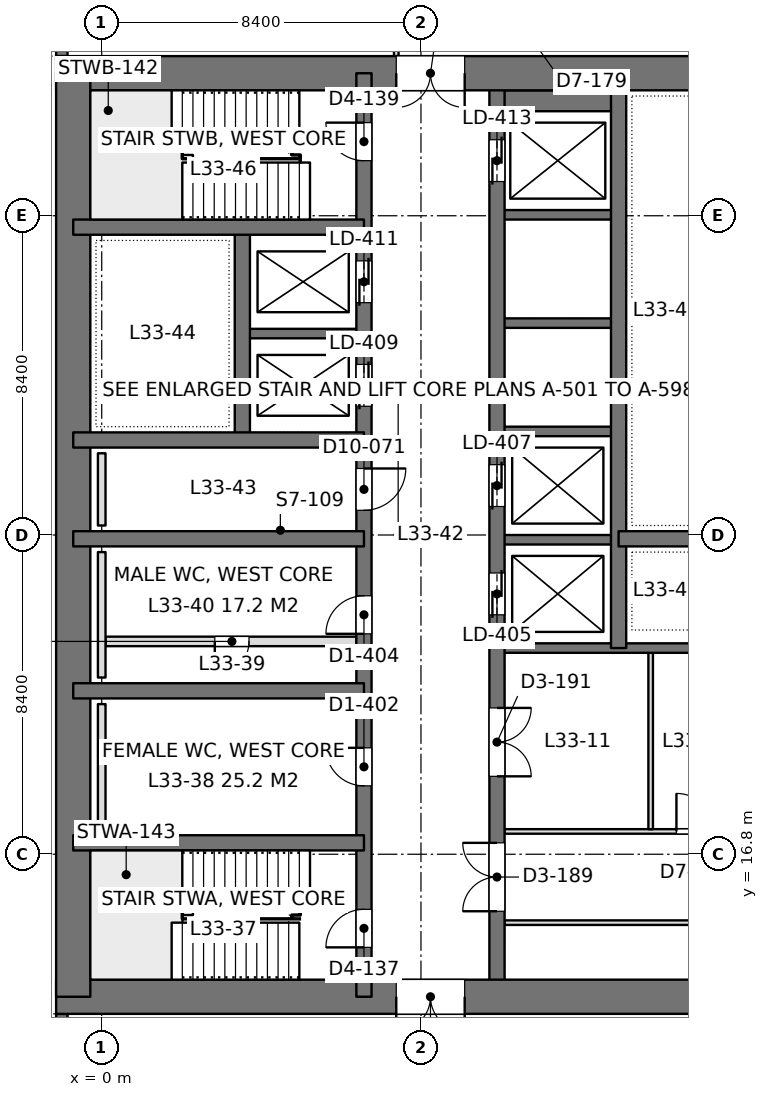
"""IFC4 building model, lengths in metres.
Left out: names, types, materials, properties, quantities, classifications, styles, units other than length and angle.
Written with IfcOpenShell. Run it as: python <this file> out.ifc"""

import sys

from ifc_helpers import new_model, si_unit, direction, frame, frame_2d, origin, place, context, subcontext, project, spatial, rectangle, extrude, element, fill, save


model = new_model("IFC4")
c1 = context("Model", 3, precision=1e-05, world=origin(), true_north=direction((0.0, 1.0)))
c2 = subcontext(c1, "Body", "Model", "MODEL_VIEW")
j1 = project(units=[si_unit("LENGTHUNIT", "METRE"), si_unit("PLANEANGLEUNIT", "RADIAN")], contexts=[c1])
p1 = place(None, origin())
s1 = spatial("IfcSite", under=j1, at=p1, CompositionType="ELEMENT")
p2 = place(p1, origin())
s2 = spatial("IfcBuilding", under=s1, at=p2, CompositionType="ELEMENT")
p3 = place(p2, frame((0.0, 0.0, 147.0)))
s3 = spatial("IfcBuildingStorey", under=s2, at=p3, CompositionType="ELEMENT", Elevation=147.0)
p4 = place(p3, frame((-1.2, 13.05, 0.0), z_axis=(0.0, 0.0, 1.0), x_axis=(1.0, 0.0, 0.0)))
e1 = element("IfcWall", 1, at=p4, inside=s3, PredefinedType="SHEAR", context=c2, shape_type="SweptSolid", body=[
    extrude(rectangle(XDim=18.0, YDim=0.9, at=frame_2d((9.0, 0.0))), origin(), (0.0, 0.0, 1.0), 4.2),
])
p5 = place(p4, frame((8.95, 0.0, 0.0)))
e2 = element("IfcOpeningElement", 2, at=p5, cuts=e1, PredefinedType="OPENING", context=c2, shape_type="SweptSolid", body=[
    extrude(rectangle(XDim=1.8, YDim=2.4, at=frame_2d((0.9, 1.2))), frame((0.0, 0.46, 0.0), z_axis=(0.0, -1.0, 0.0), x_axis=(1.0, 0.0, 0.0)), (0.0, 0.0, 1.0), 0.92),
])
p6 = place(p3, frame((-1.2, 37.35, 0.0), z_axis=(0.0, 0.0, 1.0), x_axis=(1.0, 0.0, 0.0)))
e3 = element("IfcWall", 3, at=p6, inside=s3, PredefinedType="SHEAR", context=c2, shape_type="SweptSolid", body=[
    extrude(rectangle(XDim=18.0, YDim=0.9, at=frame_2d((9.0, 0.0))), origin(), (0.0, 0.0, 1.0), 4.2),
])
p7 = place(p6, frame((8.95, 0.0, 0.0)))
e4 = element("IfcOpeningElement", 4, at=p7, cuts=e3, PredefinedType="OPENING", context=c2, shape_type="SweptSolid", body=[
    extrude(rectangle(XDim=1.8, YDim=2.4, at=frame_2d((0.9, 1.2))), frame((0.0, 0.46, 0.0), z_axis=(0.0, -1.0, 0.0), x_axis=(1.0, 0.0, 0.0)), (0.0, 0.0, 1.0), 0.92),
])
p8 = place(p3, frame((-0.75, 13.05, 0.0), z_axis=(0.0, 0.0, 1.0), x_axis=(0.0, 1.0, 0.0)))
e5 = element("IfcWall", 5, at=p8, inside=s3, PredefinedType="SHEAR", context=c2, shape_type="SweptSolid", body=[
    extrude(rectangle(XDim=24.3, YDim=0.9, at=frame_2d((12.15, 0.0))), origin(), (0.0, 0.0, 1.0), 4.2),
])
p9 = place(p3, frame((6.9, 13.05, 0.0), z_axis=(0.0, 0.0, 1.0), x_axis=(0.0, 1.0, 0.0)))
e6 = element("IfcWall", 6, at=p9, inside=s3, PredefinedType="SHEAR", context=c2, shape_type="SweptSolid", body=[
    extrude(rectangle(XDim=24.3, YDim=0.4, at=frame_2d((12.15, 0.0))), origin(), (0.0, 0.0, 1.0), 4.2),
])
p10 = place(p9, frame((1.3, 0.0, 0.0)))
e7 = element("IfcOpeningElement", 7, at=p10, cuts=e6, PredefinedType="OPENING", context=c2, shape_type="SweptSolid", body=[
    extrude(rectangle(XDim=1.0, YDim=2.2, at=frame_2d((0.5, 1.1))), frame((0.0, 0.21, 0.0), z_axis=(0.0, -1.0, 0.0), x_axis=(1.0, 0.0, 0.0)), (0.0, 0.0, 1.0), 0.42),
])
p11 = place(p9, frame((22.0, 0.0, 0.0)))
e8 = element("IfcOpeningElement", 8, at=p11, cuts=e6, PredefinedType="OPENING", context=c2, shape_type="SweptSolid", body=[
    extrude(rectangle(XDim=1.0, YDim=2.2, at=frame_2d((0.5, 1.1))), frame((0.0, 0.21, 0.0), z_axis=(0.0, -1.0, 0.0), x_axis=(1.0, 0.0, 0.0)), (0.0, 0.0, 1.0), 0.42),
])
p12 = place(p9, frame((5.55, 0.0, 0.0)))
e9 = element("IfcOpeningElement", 9, at=p12, cuts=e6, PredefinedType="OPENING", context=c2, shape_type="SweptSolid", body=[
    extrude(rectangle(XDim=1.0, YDim=2.2, at=frame_2d((0.5, 1.1))), frame((0.0, 0.21, 0.0), z_axis=(0.0, -1.0, 0.0), x_axis=(1.0, 0.0, 0.0)), (0.0, 0.0, 1.0), 0.42),
])
p13 = place(p9, frame((9.55, 0.0, 0.0)))
e10 = element("IfcOpeningElement", 10, at=p13, cuts=e6, PredefinedType="OPENING", context=c2, shape_type="SweptSolid", body=[
    extrude(rectangle(XDim=1.0, YDim=2.2, at=frame_2d((0.5, 1.1))), frame((0.0, 0.21, 0.0), z_axis=(0.0, -1.0, 0.0), x_axis=(1.0, 0.0, 0.0)), (0.0, 0.0, 1.0), 0.42),
])
p14 = place(p9, frame((12.8, 0.0, 0.0)))
e11 = element("IfcOpeningElement", 11, at=p14, cuts=e6, PredefinedType="OPENING", context=c2, shape_type="SweptSolid", body=[
    extrude(rectangle(XDim=1.1, YDim=2.2, at=frame_2d((0.55, 1.1))), frame((0.0, 0.21, 0.0), z_axis=(0.0, -1.0, 0.0), x_axis=(1.0, 0.0, 0.0)), (0.0, 0.0, 1.0), 0.42),
])
p15 = place(p9, frame((15.538, 0.0, 0.0)))
e12 = element("IfcOpeningElement", 12, at=p15, cuts=e6, PredefinedType="OPENING", context=c2, shape_type="SweptSolid", body=[
    extrude(rectangle(XDim=1.1, YDim=2.2, at=frame_2d((0.55, 1.1))), frame((0.0, 0.21, 0.0), z_axis=(0.0, -1.0, 0.0), x_axis=(1.0, 0.0, 0.0)), (0.0, 0.0, 1.0), 0.42),
])
p16 = place(p9, frame((18.262, 0.0, 0.0)))
e13 = element("IfcOpeningElement", 13, at=p16, cuts=e6, PredefinedType="OPENING", context=c2, shape_type="SweptSolid", body=[
    extrude(rectangle(XDim=1.1, YDim=2.2, at=frame_2d((0.55, 1.1))), frame((0.0, 0.21, 0.0), z_axis=(0.0, -1.0, 0.0), x_axis=(1.0, 0.0, 0.0)), (0.0, 0.0, 1.0), 0.42),
])
p17 = place(p3, frame((10.4, 13.05, 0.0), z_axis=(0.0, 0.0, 1.0), x_axis=(0.0, 1.0, 0.0)))
e14 = element("IfcWall", 14, at=p17, inside=s3, PredefinedType="SHEAR", context=c2, shape_type="SweptSolid", body=[
    extrude(rectangle(XDim=24.3, YDim=0.4, at=frame_2d((12.15, 0.0))), origin(), (0.0, 0.0, 1.0), 4.2),
])
p18 = place(p17, frame((10.05, 0.0, 0.0)))
e15 = element("IfcOpeningElement", 15, at=p18, cuts=e14, PredefinedType="OPENING", context=c2, shape_type="SweptSolid", body=[
    extrude(rectangle(XDim=1.1, YDim=2.2, at=frame_2d((0.55, 1.1))), frame((0.0, 0.21, 0.0), z_axis=(0.0, -1.0, 0.0), x_axis=(1.0, 0.0, 0.0)), (0.0, 0.0, 1.0), 0.42),
])
p19 = place(p17, frame((12.9, 0.0, 0.0)))
e16 = element("IfcOpeningElement", 16, at=p19, cuts=e14, PredefinedType="OPENING", context=c2, shape_type="SweptSolid", body=[
    extrude(rectangle(XDim=1.1, YDim=2.2, at=frame_2d((0.55, 1.1))), frame((0.0, 0.21, 0.0), z_axis=(0.0, -1.0, 0.0), x_axis=(1.0, 0.0, 0.0)), (0.0, 0.0, 1.0), 0.42),
])
p20 = place(p17, frame((21.45, 0.0, 0.0)))
e17 = element("IfcOpeningElement", 17, at=p20, cuts=e14, PredefinedType="OPENING", context=c2, shape_type="SweptSolid", body=[
    extrude(rectangle(XDim=1.1, YDim=2.2, at=frame_2d((0.55, 1.1))), frame((0.0, 0.21, 0.0), z_axis=(0.0, -1.0, 0.0), x_axis=(1.0, 0.0, 0.0)), (0.0, 0.0, 1.0), 0.42),
])
p21 = place(p17, frame((2.25, 0.0, 0.0)))
e18 = element("IfcOpeningElement", 18, at=p21, cuts=e14, PredefinedType="OPENING", context=c2, shape_type="SweptSolid", body=[
    extrude(rectangle(XDim=1.8, YDim=2.4, at=frame_2d((0.9, 1.2))), frame((0.0, 0.21, 0.0), z_axis=(0.0, -1.0, 0.0), x_axis=(1.0, 0.0, 0.0)), (0.0, 0.0, 1.0), 0.42),
])
p22 = place(p17, frame((5.8, 0.0, 0.0)))
e19 = element("IfcOpeningElement", 19, at=p22, cuts=e14, PredefinedType="OPENING", context=c2, shape_type="SweptSolid", body=[
    extrude(rectangle(XDim=1.8, YDim=2.4, at=frame_2d((0.9, 1.2))), frame((0.0, 0.21, 0.0), z_axis=(0.0, -1.0, 0.0), x_axis=(1.0, 0.0, 0.0)), (0.0, 0.0, 1.0), 0.42),
])
p23 = place(p3, frame((13.6, 22.225, 0.0), z_axis=(0.0, 0.0, 1.0), x_axis=(0.0, 1.0, 0.0)))
e20 = element("IfcWall", 20, at=p23, inside=s3, PredefinedType="SHEAR", context=c2, shape_type="SweptSolid", body=[
    extrude(rectangle(XDim=15.125, YDim=0.4, at=frame_2d((7.562, 0.0))), origin(), (0.0, 0.0, 1.0), 4.2),
])
for number, where, z_axis, x_axis in (
    (21, (-0.75, 17.1, 0.0), (0.0, 0.0, 1.0), (1.0, 0.0, 0.0)),
    (22, (-0.75, 21.1, 0.0), (0.0, 0.0, 1.0), (1.0, 0.0, 0.0)),
    (23, (-0.75, 25.1, 0.0), (0.0, 0.0, 1.0), (1.0, 0.0, 0.0)),
    (24, (-0.75, 27.7, 0.0), (0.0, 0.0, 1.0), (1.0, 0.0, 0.0)),
    (25, (-0.75, 33.3, 0.0), (0.0, 0.0, 1.0), (1.0, 0.0, 0.0)),
):
    element("IfcWall", number, at=place(p3, frame(where, z_axis=z_axis, x_axis=x_axis)), inside=s3, PredefinedType="SHEAR", context=c2, shape_type="SweptSolid", body=[
        extrude(rectangle(XDim=7.65, YDim=0.4, at=frame_2d((3.825, 0.0))), origin(), (0.0, 0.0, 1.0), 4.2),
    ])
p24 = place(p3, frame((3.7, 27.7, 0.0), z_axis=(0.0, 0.0, 1.0), x_axis=(0.0, 1.0, 0.0)))
e26 = element("IfcWall", 26, at=p24, inside=s3, PredefinedType="SHEAR", context=c2, shape_type="SweptSolid", body=[
    extrude(rectangle(XDim=5.6, YDim=0.4, at=frame_2d((2.8, 0.0))), origin(), (0.0, 0.0, 1.0), 4.2),
])
p25 = place(p3, frame((3.7, 30.5, 0.0), z_axis=(0.0, 0.0, 1.0), x_axis=(1.0, 0.0, 0.0)))
e27 = element("IfcWall", 27, at=p25, inside=s3, PredefinedType="SHEAR", context=c2, shape_type="SweptSolid", body=[
    extrude(rectangle(XDim=3.2, YDim=0.25, at=frame_2d((1.6, 0.0))), origin(), (0.0, 0.0, 1.0), 4.2),
])
p26 = place(p3, frame((13.6, 25.1, 0.0), z_axis=(0.0, 0.0, 1.0), x_axis=(1.0, 0.0, 0.0)))
e28 = element("IfcWall", 28, at=p26, inside=s3, PredefinedType="SHEAR", context=c2, shape_type="SweptSolid", body=[
    extrude(rectangle(XDim=2.75, YDim=0.4, at=frame_2d((1.375, 0.0))), origin(), (0.0, 0.0, 1.0), 4.2),
])
p27 = place(p3, frame((10.4, 22.225, 0.0), z_axis=(0.0, 0.0, 1.0), x_axis=(1.0, 0.0, 0.0)))
e29 = element("IfcWall", 29, at=p27, inside=s3, PredefinedType="SHEAR", context=c2, shape_type="SweptSolid", body=[
    extrude(rectangle(XDim=5.95, YDim=0.25, at=frame_2d((2.975, 0.0))), origin(), (0.0, 0.0, 1.0), 4.2),
])
for number, where, z_axis, x_axis in (
    (30, (10.4, 25.075, 0.0), (0.0, 0.0, 1.0), (1.0, 0.0, 0.0)),
    (31, (10.4, 27.925, 0.0), (0.0, 0.0, 1.0), (1.0, 0.0, 0.0)),
    (32, (10.4, 30.775, 0.0), (0.0, 0.0, 1.0), (1.0, 0.0, 0.0)),
    (33, (10.4, 33.625, 0.0), (0.0, 0.0, 1.0), (1.0, 0.0, 0.0)),
):
    element("IfcWall", number, at=place(p3, frame(where, z_axis=z_axis, x_axis=x_axis)), inside=s3, PredefinedType="SHEAR", context=c2, shape_type="SweptSolid", body=[
        extrude(rectangle(XDim=3.2, YDim=0.25, at=frame_2d((1.6, 0.0))), origin(), (0.0, 0.0, 1.0), 4.2),
    ])
p28 = place(p3, frame((10.4, 36.625, 0.0), z_axis=(0.0, 0.0, 1.0), x_axis=(1.0, 0.0, 0.0)))
e34 = element("IfcWall", 34, at=p28, inside=s3, PredefinedType="SHEAR", context=c2, shape_type="SweptSolid", body=[
    extrude(rectangle(XDim=3.2, YDim=0.55, at=frame_2d((1.6, 0.0))), origin(), (0.0, 0.0, 1.0), 4.2),
])
p29 = place(p3, frame((-1.05, 8.4, 0.0), z_axis=(0.0, 0.0, 1.0), x_axis=(0.0, 1.0, 0.0)))
e35 = element("IfcWall", 35, at=p29, inside=s3, PredefinedType="SOLIDWALL", context=c2, shape_type="SweptSolid", body=[
    extrude(rectangle(XDim=4.2, YDim=0.3, at=frame_2d((2.1, 0.0))), origin(), (0.0, 0.0, 1.0), 4.05),
])
p30 = place(p29, frame((0.9, 0.0, 0.9)))
e36 = element("IfcOpeningElement", 36, at=p30, cuts=e35, PredefinedType="OPENING", context=c2, shape_type="SweptSolid", body=[
    extrude(rectangle(XDim=2.4, YDim=1.9, at=frame_2d((1.2, 0.95))), frame((0.0, 0.16, 0.0), z_axis=(0.0, -1.0, 0.0), x_axis=(1.0, 0.0, 0.0)), (0.0, 0.0, 1.0), 0.32),
])
p31 = place(p3, frame((-1.05, 37.8, 0.0), z_axis=(0.0, 0.0, 1.0), x_axis=(0.0, 1.0, 0.0)))
e37 = element("IfcWall", 37, at=p31, inside=s3, PredefinedType="SOLIDWALL", context=c2, shape_type="SweptSolid", body=[
    extrude(rectangle(XDim=4.2, YDim=0.3, at=frame_2d((2.1, 0.0))), origin(), (0.0, 0.0, 1.0), 4.05),
])
p32 = place(p31, frame((0.9, 0.0, 0.9)))
e38 = element("IfcOpeningElement", 38, at=p32, cuts=e37, PredefinedType="OPENING", context=c2, shape_type="SweptSolid", body=[
    extrude(rectangle(XDim=2.4, YDim=1.9, at=frame_2d((1.2, 0.95))), frame((0.0, 0.16, 0.0), z_axis=(0.0, -1.0, 0.0), x_axis=(1.0, 0.0, 0.0)), (0.0, 0.0, 1.0), 0.32),
])
p33 = place(p3, frame((10.598, 17.4, 0.0), z_axis=(0.0, 0.0, 1.0), x_axis=(1.0, 0.0, 0.0)))
e39 = element("IfcWall", 39, at=p33, inside=s3, PredefinedType="PARTITIONING", context=c2, shape_type="SweptSolid", body=[
    extrude(rectangle(XDim=5.904, YDim=0.12, at=frame_2d((2.952, 0.0))), origin(), (0.0, 0.0, 1.0), 3.55),
])
p34 = place(p33, frame((4.524, 0.0, 0.0)))
e40 = element("IfcOpeningElement", 40, at=p34, cuts=e39, PredefinedType="OPENING", context=c2, shape_type="SweptSolid", body=[
    extrude(rectangle(XDim=1.0, YDim=2.4, at=frame_2d((0.5, 1.2))), frame((0.0, 0.07, 0.0), z_axis=(0.0, -1.0, 0.0), x_axis=(1.0, 0.0, 0.0)), (0.0, 0.0, 1.0), 0.14),
])
p35 = place(p3, frame((14.444, 17.458, 0.0), z_axis=(0.0, 0.0, 1.0), x_axis=(0.0, 1.0, 0.0)))
e41 = element("IfcWall", 41, at=p35, inside=s3, PredefinedType="PARTITIONING", context=c2, shape_type="SweptSolid", body=[
    extrude(rectangle(XDim=4.644, YDim=0.12, at=frame_2d((2.322, 0.0))), origin(), (0.0, 0.0, 1.0), 3.6),
])
p36 = place(p3, frame((10.598, 15.0, 0.0), z_axis=(0.0, 0.0, 1.0), x_axis=(1.0, 0.0, 0.0)))
e42 = element("IfcWall", 42, at=p36, inside=s3, PredefinedType="PARTITIONING", context=c2, shape_type="SweptSolid", body=[
    extrude(rectangle(XDim=6.204, YDim=0.12, at=frame_2d((3.102, 0.0))), origin(), (0.0, 0.0, 1.0), 3.55),
])
p37 = place(p3, frame((7.75, 37.8, 0.0), z_axis=(0.0, 0.0, 1.0), x_axis=(0.0, 1.0, 0.0)))
e43 = element("IfcWall", 43, at=p37, inside=s3, PredefinedType="PARTITIONING", context=c2, shape_type="SweptSolid", body=[
    extrude(rectangle(XDim=2.0, YDim=0.12, at=frame_2d((1.0, 0.0))), origin(), (0.0, 0.0, 1.0), 4.05),
])
p38 = place(p3, frame((0.1, 22.4, 0.0), z_axis=(0.0, 0.0, 1.0), x_axis=(1.0, 0.0, 0.0)))
e44 = element("IfcWall", 44, at=p38, inside=s3, PredefinedType="PARTITIONING", context=c2, shape_type="SweptSolid", body=[
    extrude(rectangle(XDim=6.6, YDim=0.25, at=frame_2d((3.3, 0.0))), origin(), (0.0, 0.0, 1.0), 4.0),
])
p39 = place(p38, frame((2.875, 0.0, 0.0)))
e45 = element("IfcOpeningElement", 45, at=p39, cuts=e44, PredefinedType="OPENING", context=c2, shape_type="SweptSolid", body=[
    extrude(rectangle(XDim=0.9, YDim=2.2, at=frame_2d((0.45, 1.1))), frame((0.0, 0.135, 0.0), z_axis=(0.0, -1.0, 0.0), x_axis=(1.0, 0.0, 0.0)), (0.0, 0.0, 1.0), 0.27),
])
for number, where, z_axis, x_axis in (
    (46, (0.0, 17.45, 0.0), (0.0, 0.0, 1.0), (0.0, 1.0, 0.0)),
    (47, (0.0, 21.45, 0.0), (0.0, 0.0, 1.0), (0.0, 1.0, 0.0)),
):
    element("IfcWall", number, at=place(p3, frame(where, z_axis=z_axis, x_axis=x_axis)), inside=s3, PredefinedType="PLUMBINGWALL", context=c2, shape_type="SweptSolid", body=[
        extrude(rectangle(XDim=3.3, YDim=0.2, at=frame_2d((1.65, 0.0))), origin(), (0.0, 0.0, 1.0), 1.2),
    ])
p40 = place(p3, frame((0.0, 25.45, 0.0), z_axis=(0.0, 0.0, 1.0), x_axis=(0.0, 1.0, 0.0)))
e48 = element("IfcWall", 48, at=p40, inside=s3, PredefinedType="PLUMBINGWALL", context=c2, shape_type="SweptSolid", body=[
    extrude(rectangle(XDim=1.9, YDim=0.2, at=frame_2d((0.95, 0.0))), origin(), (0.0, 0.0, 1.0), 1.2),
])
p41 = place(p5, frame((1.8, 0.0, 0.0), z_axis=(0.0, 0.0, 1.0), x_axis=(-1.0, 0.0, 0.0)))
e49 = element("IfcDoor", 49, at=p41, inside=s3, OperationType="DOUBLE_DOOR_SINGLE_SWING", PredefinedType="DOOR", context=c2, shape_type="SweptSolid", body=[
    extrude(rectangle(XDim=1.8, YDim=2.4, at=frame_2d((0.9, 1.2))), frame((0.0, 0.025, 0.0), z_axis=(0.0, -1.0, 0.0), x_axis=(1.0, 0.0, 0.0)), (0.0, 0.0, 1.0), 0.05),
])
fill(e2, e49)
p42 = place(p7, frame((1.8, 0.0, 0.0), z_axis=(0.0, 0.0, 1.0), x_axis=(-1.0, 0.0, 0.0)))
e50 = element("IfcDoor", 50, at=p42, inside=s3, OperationType="DOUBLE_DOOR_SINGLE_SWING", PredefinedType="DOOR", context=c2, shape_type="SweptSolid", body=[
    extrude(rectangle(XDim=1.8, YDim=2.4, at=frame_2d((0.9, 1.2))), frame((0.0, 0.025, 0.0), z_axis=(0.0, -1.0, 0.0), x_axis=(1.0, 0.0, 0.0)), (0.0, 0.0, 1.0), 0.05),
])
fill(e4, e50)
p43 = place(p10, origin())
e51 = element("IfcDoor", 51, at=p43, inside=s3, OperationType="SINGLE_SWING_LEFT", PredefinedType="DOOR", context=c2, shape_type="SweptSolid", body=[
    extrude(rectangle(XDim=1.0, YDim=2.2, at=frame_2d((0.5, 1.1))), frame((0.0, 0.025, 0.0), z_axis=(0.0, -1.0, 0.0), x_axis=(1.0, 0.0, 0.0)), (0.0, 0.0, 1.0), 0.05),
])
fill(e7, e51)
p44 = place(p11, origin())
e52 = element("IfcDoor", 52, at=p44, inside=s3, OperationType="SINGLE_SWING_RIGHT", PredefinedType="DOOR", context=c2, shape_type="SweptSolid", body=[
    extrude(rectangle(XDim=1.0, YDim=2.2, at=frame_2d((0.5, 1.1))), frame((0.0, 0.025, 0.0), z_axis=(0.0, -1.0, 0.0), x_axis=(1.0, 0.0, 0.0)), (0.0, 0.0, 1.0), 0.05),
])
fill(e8, e52)
p45 = place(p12, origin())
e53 = element("IfcDoor", 53, at=p45, inside=s3, OperationType="SINGLE_SWING_RIGHT", PredefinedType="DOOR", context=c2, shape_type="SweptSolid", body=[
    extrude(rectangle(XDim=1.0, YDim=2.2, at=frame_2d((0.5, 1.1))), frame((0.0, 0.025, 0.0), z_axis=(0.0, -1.0, 0.0), x_axis=(1.0, 0.0, 0.0)), (0.0, 0.0, 1.0), 0.05),
])
fill(e9, e53)
p46 = place(p13, origin())
e54 = element("IfcDoor", 54, at=p46, inside=s3, OperationType="SINGLE_SWING_LEFT", PredefinedType="DOOR", context=c2, shape_type="SweptSolid", body=[
    extrude(rectangle(XDim=1.0, YDim=2.2, at=frame_2d((0.5, 1.1))), frame((0.0, 0.025, 0.0), z_axis=(0.0, -1.0, 0.0), x_axis=(1.0, 0.0, 0.0)), (0.0, 0.0, 1.0), 0.05),
])
fill(e10, e54)
p47 = place(p14, frame((1.1, 0.0, 0.0), z_axis=(0.0, 0.0, 1.0), x_axis=(-1.0, 0.0, 0.0)))
e55 = element("IfcDoor", 55, at=p47, inside=s3, OperationType="SINGLE_SWING_LEFT", PredefinedType="DOOR", context=c2, shape_type="SweptSolid", body=[
    extrude(rectangle(XDim=1.1, YDim=2.2, at=frame_2d((0.55, 1.1))), frame((0.0, 0.025, 0.0), z_axis=(0.0, -1.0, 0.0), x_axis=(1.0, 0.0, 0.0)), (0.0, 0.0, 1.0), 0.05),
])
fill(e11, e55)
p48 = place(p18, origin())
e56 = element("IfcDoor", 56, at=p48, inside=s3, OperationType="DOUBLE_DOOR_SLIDING", PredefinedType="DOOR", context=c2, shape_type="SweptSolid", body=[
    extrude(rectangle(XDim=1.1, YDim=2.2, at=frame_2d((0.55, 1.1))), frame((0.0, 0.025, 0.0), z_axis=(0.0, -1.0, 0.0), x_axis=(1.0, 0.0, 0.0)), (0.0, 0.0, 1.0), 0.05),
])
fill(e15, e56)
p49 = place(p19, origin())
e57 = element("IfcDoor", 57, at=p49, inside=s3, OperationType="DOUBLE_DOOR_SLIDING", PredefinedType="DOOR", context=c2, shape_type="SweptSolid", body=[
    extrude(rectangle(XDim=1.1, YDim=2.2, at=frame_2d((0.55, 1.1))), frame((0.0, 0.025, 0.0), z_axis=(0.0, -1.0, 0.0), x_axis=(1.0, 0.0, 0.0)), (0.0, 0.0, 1.0), 0.05),
])
fill(e16, e57)
p50 = place(p20, origin())
e58 = element("IfcDoor", 58, at=p50, inside=s3, OperationType="DOUBLE_DOOR_SLIDING", PredefinedType="DOOR", context=c2, shape_type="SweptSolid", body=[
    extrude(rectangle(XDim=1.1, YDim=2.2, at=frame_2d((0.55, 1.1))), frame((0.0, 0.025, 0.0), z_axis=(0.0, -1.0, 0.0), x_axis=(1.0, 0.0, 0.0)), (0.0, 0.0, 1.0), 0.05),
])
fill(e17, e58)
p51 = place(p15, origin())
e59 = element("IfcDoor", 59, at=p51, inside=s3, OperationType="DOUBLE_DOOR_SLIDING", PredefinedType="DOOR", context=c2, shape_type="SweptSolid", body=[
    extrude(rectangle(XDim=1.1, YDim=2.2, at=frame_2d((0.55, 1.1))), frame((0.0, 0.025, 0.0), z_axis=(0.0, -1.0, 0.0), x_axis=(1.0, 0.0, 0.0)), (0.0, 0.0, 1.0), 0.05),
])
fill(e12, e59)
p52 = place(p16, origin())
e60 = element("IfcDoor", 60, at=p52, inside=s3, OperationType="DOUBLE_DOOR_SLIDING", PredefinedType="DOOR", context=c2, shape_type="SweptSolid", body=[
    extrude(rectangle(XDim=1.1, YDim=2.2, at=frame_2d((0.55, 1.1))), frame((0.0, 0.025, 0.0), z_axis=(0.0, -1.0, 0.0), x_axis=(1.0, 0.0, 0.0)), (0.0, 0.0, 1.0), 0.05),
])
fill(e13, e60)
p53 = place(p21, origin())
e61 = element("IfcDoor", 61, at=p53, inside=s3, OperationType="DOUBLE_DOOR_SINGLE_SWING", PredefinedType="DOOR", context=c2, shape_type="SweptSolid", body=[
    extrude(rectangle(XDim=1.8, YDim=2.4, at=frame_2d((0.9, 1.2))), frame((0.0, 0.025, 0.0), z_axis=(0.0, -1.0, 0.0), x_axis=(1.0, 0.0, 0.0)), (0.0, 0.0, 1.0), 0.05),
])
fill(e18, e61)
p54 = place(p22, frame((1.8, 0.0, 0.0), z_axis=(0.0, 0.0, 1.0), x_axis=(-1.0, 0.0, 0.0)))
e62 = element("IfcDoor", 62, at=p54, inside=s3, OperationType="DOUBLE_DOOR_SINGLE_SWING", PredefinedType="DOOR", context=c2, shape_type="SweptSolid", body=[
    extrude(rectangle(XDim=1.8, YDim=2.4, at=frame_2d((0.9, 1.2))), frame((0.0, 0.025, 0.0), z_axis=(0.0, -1.0, 0.0), x_axis=(1.0, 0.0, 0.0)), (0.0, 0.0, 1.0), 0.05),
])
fill(e19, e62)
p55 = place(p34, origin())
e63 = element("IfcDoor", 63, at=p55, inside=s3, OperationType="SINGLE_SWING_LEFT", PredefinedType="DOOR", context=c2, shape_type="SweptSolid", body=[
    extrude(rectangle(XDim=1.0, YDim=2.4, at=frame_2d((0.5, 1.2))), frame((0.0, 0.025, 0.0), z_axis=(0.0, -1.0, 0.0), x_axis=(1.0, 0.0, 0.0)), (0.0, 0.0, 1.0), 0.05),
])
fill(e40, e63)
p56 = place(p39, frame((0.9, 0.0, 0.0), z_axis=(0.0, 0.0, 1.0), x_axis=(-1.0, 0.0, 0.0)))
e64 = element("IfcDoor", 64, at=p56, inside=s3, OperationType="SINGLE_SWING_RIGHT", PredefinedType="DOOR", context=c2, shape_type="SweptSolid", body=[
    extrude(rectangle(XDim=0.9, YDim=2.2, at=frame_2d((0.45, 1.1))), frame((0.0, 0.025, 0.0), z_axis=(0.0, -1.0, 0.0), x_axis=(1.0, 0.0, 0.0)), (0.0, 0.0, 1.0), 0.05),
])
fill(e45, e64)
save(model, sys.argv[1])
